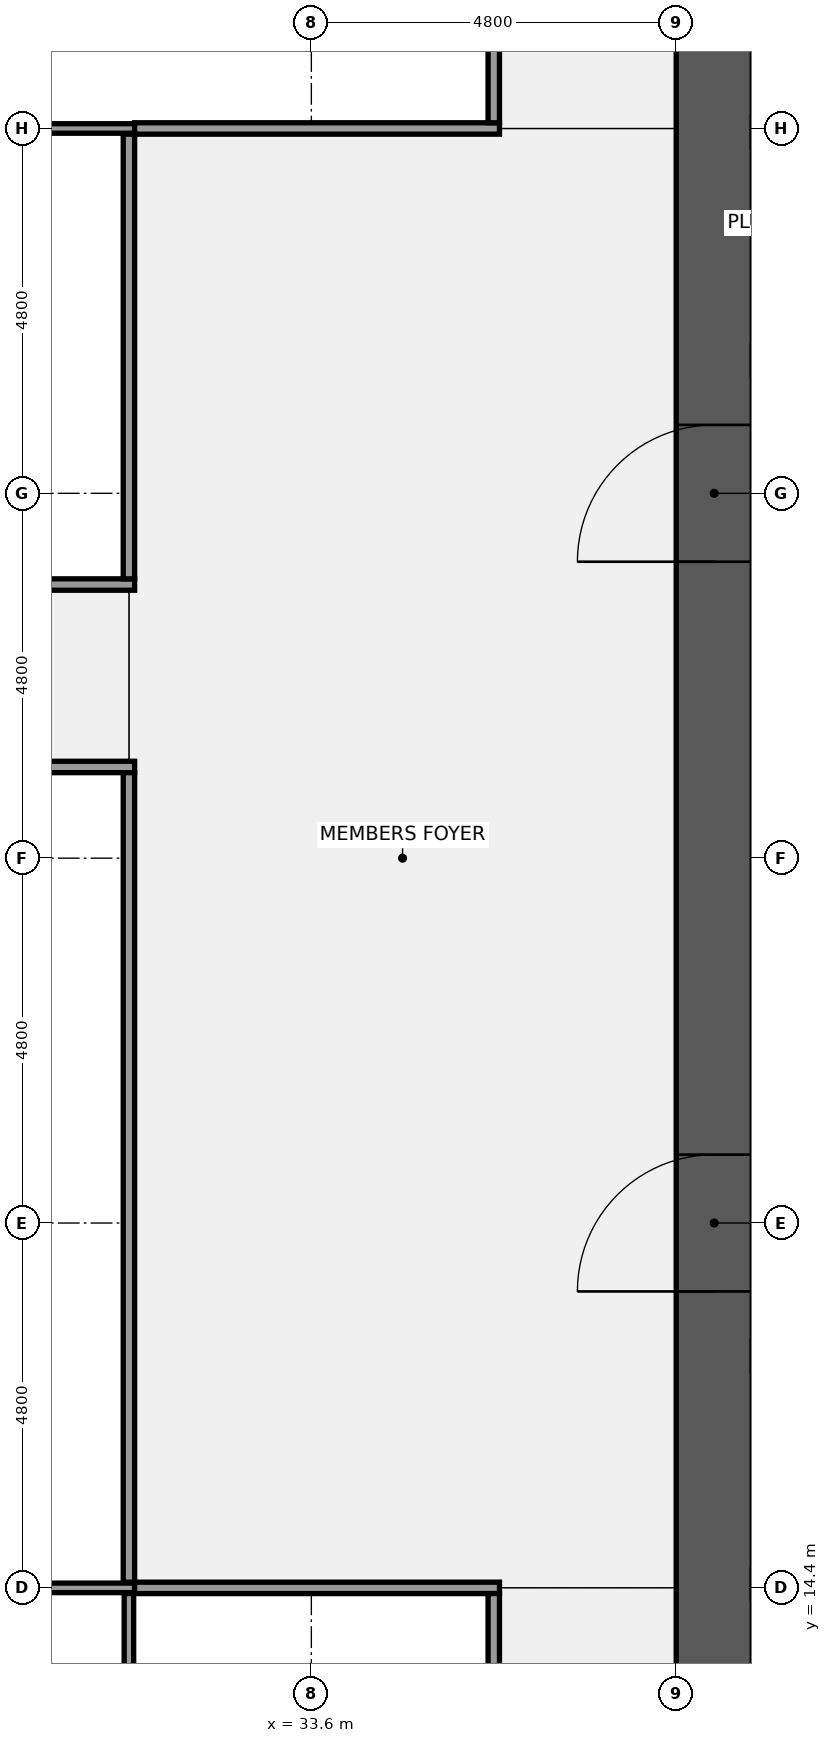
"""IFC4 building model, lengths in metres.
Left out: names, types, materials, properties, quantities, classifications, styles, units other than length and angle.
Written with IfcOpenShell. Run it as: python <this file> out.ifc"""

import sys

from ifc_helpers import new_model, si_unit, direction, frame, frame_2d, origin, place, context, subcontext, project, spatial, rectangle, extrude, element, fill, save


model = new_model("IFC4")
c1 = context("Model", 3, precision=1e-05, world=origin(), true_north=direction((0.0, 1.0)))
c2 = subcontext(c1, "Body", "Model", "MODEL_VIEW")
j1 = project(units=[si_unit("LENGTHUNIT", "METRE"), si_unit("PLANEANGLEUNIT", "RADIAN")], contexts=[c1])
p1 = place(None, origin())
s1 = spatial("IfcSite", under=j1, at=p1, CompositionType="ELEMENT")
p2 = place(p1, origin())
s2 = spatial("IfcBuilding", under=s1, at=p2, CompositionType="ELEMENT")
p3 = place(p2, frame((0.0, 0.0, 132.1)))
s3 = spatial("IfcBuildingStorey", under=s2, at=p3, CompositionType="ELEMENT", Elevation=132.1)
p4 = place(p3, frame((38.9, 9.6, 0.0), z_axis=(0.0, 0.0, 1.0), x_axis=(0.0, 1.0, 0.0)))
e1 = element("IfcWall", 1, at=p4, inside=s3, PredefinedType="SHEAR", context=c2, shape_type="SweptSolid", body=[
    extrude(rectangle(XDim=28.8, YDim=1.0, at=frame_2d((14.4, 0.0))), origin(), (0.0, 0.0, 1.0), 3.84),
])
p5 = place(p4, frame((8.7, 0.0, 0.0)))
e2 = element("IfcOpeningElement", 2, at=p5, cuts=e1, PredefinedType="OPENING", context=c2, shape_type="SweptSolid", body=[
    extrude(rectangle(XDim=1.8, YDim=2.1, at=frame_2d((0.9, 1.05))), frame((0.0, 0.51, 0.0), z_axis=(0.0, -1.0, 0.0), x_axis=(1.0, 0.0, 0.0)), (0.0, 0.0, 1.0), 1.02),
])
p6 = place(p4, frame((18.3, 0.0, 0.0)))
e3 = element("IfcOpeningElement", 3, at=p6, cuts=e1, PredefinedType="OPENING", context=c2, shape_type="SweptSolid", body=[
    extrude(rectangle(XDim=1.8, YDim=2.1, at=frame_2d((0.9, 1.05))), frame((0.0, 0.51, 0.0), z_axis=(0.0, -1.0, 0.0), x_axis=(1.0, 0.0, 0.0)), (0.0, 0.0, 1.0), 1.02),
])
p7 = place(p3, frame((26.475, 14.4, 0.0), z_axis=(0.0, 0.0, 1.0), x_axis=(1.0, 0.0, 0.0)))
e4 = element("IfcWall", 4, at=p7, inside=s3, PredefinedType="PARTITIONING", context=c2, shape_type="SweptSolid", body=[
    extrude(rectangle(XDim=4.8, YDim=0.125, at=frame_2d((2.4, 0.0))), origin(), (0.0, 0.0, 1.0), 2.936),
])
p8 = place(p3, frame((31.275, 14.4, 0.0), z_axis=(0.0, 0.0, 1.0), x_axis=(1.0, 0.0, 0.0)))
e5 = element("IfcWall", 5, at=p8, inside=s3, PredefinedType="PARTITIONING", context=c2, shape_type="SweptSolid", body=[
    extrude(rectangle(XDim=4.8, YDim=0.15, at=frame_2d((2.4, 0.0))), origin(), (0.0, 0.0, 1.0), 2.936),
])
for number, where, z_axis, x_axis in (
    (6, (26.325, 25.2, 0.0), (0.0, 0.0, 1.0), (1.0, 0.0, 0.0)),
    (7, (26.325, 27.6, 0.0), (0.0, 0.0, 1.0), (1.0, 0.0, 0.0)),
):
    element("IfcWall", number, at=place(p3, frame(where, z_axis=z_axis, x_axis=x_axis)), inside=s3, PredefinedType="PARTITIONING", context=c2, shape_type="SweptSolid", body=[
        extrude(rectangle(XDim=4.95, YDim=0.15, at=frame_2d((2.475, 0.0))), origin(), (0.0, 0.0, 1.0), 2.936),
    ])
p9 = place(p3, frame((26.475, 33.6, 0.0), z_axis=(0.0, 0.0, 1.0), x_axis=(1.0, 0.0, 0.0)))
e8 = element("IfcWall", 8, at=p9, inside=s3, PredefinedType="PARTITIONING", context=c2, shape_type="SweptSolid", body=[
    extrude(rectangle(XDim=4.8, YDim=0.125, at=frame_2d((2.4, 0.0))), origin(), (0.0, 0.0, 1.0), 2.936),
])
p10 = place(p3, frame((31.275, 33.6, 0.0), z_axis=(0.0, 0.0, 1.0), x_axis=(1.0, 0.0, 0.0)))
e9 = element("IfcWall", 9, at=p10, inside=s3, PredefinedType="PARTITIONING", context=c2, shape_type="SweptSolid", body=[
    extrude(rectangle(XDim=4.8, YDim=0.15, at=frame_2d((2.4, 0.0))), origin(), (0.0, 0.0, 1.0), 2.936),
])
p11 = place(p3, frame((31.2, 9.675, 0.0), z_axis=(0.0, 0.0, 1.0), x_axis=(0.0, 1.0, 0.0)))
e10 = element("IfcWall", 10, at=p11, inside=s3, PredefinedType="PARTITIONING", context=c2, shape_type="SweptSolid", body=[
    extrude(rectangle(XDim=4.65, YDim=0.125, at=frame_2d((2.325, 0.0))), origin(), (0.0, 0.0, 1.0), 2.936),
])
p12 = place(p3, frame((31.2, 14.475, 0.0), z_axis=(0.0, 0.0, 1.0), x_axis=(0.0, 1.0, 0.0)))
e11 = element("IfcWall", 11, at=p12, inside=s3, PredefinedType="PARTITIONING", context=c2, shape_type="SweptSolid", body=[
    extrude(rectangle(XDim=10.65, YDim=0.15, at=frame_2d((5.325, 0.0))), origin(), (0.0, 0.0, 1.0), 2.936),
])
p13 = place(p3, frame((31.2, 27.675, 0.0), z_axis=(0.0, 0.0, 1.0), x_axis=(0.0, 1.0, 0.0)))
e12 = element("IfcWall", 12, at=p13, inside=s3, PredefinedType="PARTITIONING", context=c2, shape_type="SweptSolid", body=[
    extrude(rectangle(XDim=5.85, YDim=0.15, at=frame_2d((2.925, 0.0))), origin(), (0.0, 0.0, 1.0), 2.936),
])
for number, where, z_axis, x_axis in (
    (13, (36.0, 9.675, 0.0), (0.0, 0.0, 1.0), (0.0, 1.0, 0.0)),
    (14, (36.0, 33.675, 0.0), (0.0, 0.0, 1.0), (0.0, 1.0, 0.0)),
):
    element("IfcWall", number, at=place(p3, frame(where, z_axis=z_axis, x_axis=x_axis)), inside=s3, PredefinedType="PARTITIONING", context=c2, shape_type="SweptSolid", body=[
        extrude(rectangle(XDim=4.65, YDim=0.15, at=frame_2d((2.325, 0.0))), origin(), (0.0, 0.0, 1.0), 2.936),
    ])
p14 = place(p5, origin())
e15 = element("IfcDoor", 15, at=p14, inside=s3, OperationType="DOUBLE_DOOR_SINGLE_SWING", PredefinedType="DOOR", context=c2, shape_type="SweptSolid", body=[
    extrude(rectangle(XDim=1.8, YDim=2.1, at=frame_2d((0.9, 1.05))), frame((0.0, 0.025, 0.0), z_axis=(0.0, -1.0, 0.0), x_axis=(1.0, 0.0, 0.0)), (0.0, 0.0, 1.0), 0.05),
])
fill(e2, e15)
p15 = place(p6, origin())
e16 = element("IfcDoor", 16, at=p15, inside=s3, OperationType="DOUBLE_DOOR_SINGLE_SWING", PredefinedType="DOOR", context=c2, shape_type="SweptSolid", body=[
    extrude(rectangle(XDim=1.8, YDim=2.1, at=frame_2d((0.9, 1.05))), frame((0.0, 0.025, 0.0), z_axis=(0.0, -1.0, 0.0), x_axis=(1.0, 0.0, 0.0)), (0.0, 0.0, 1.0), 0.05),
])
fill(e3, e16)
save(model, sys.argv[1])
